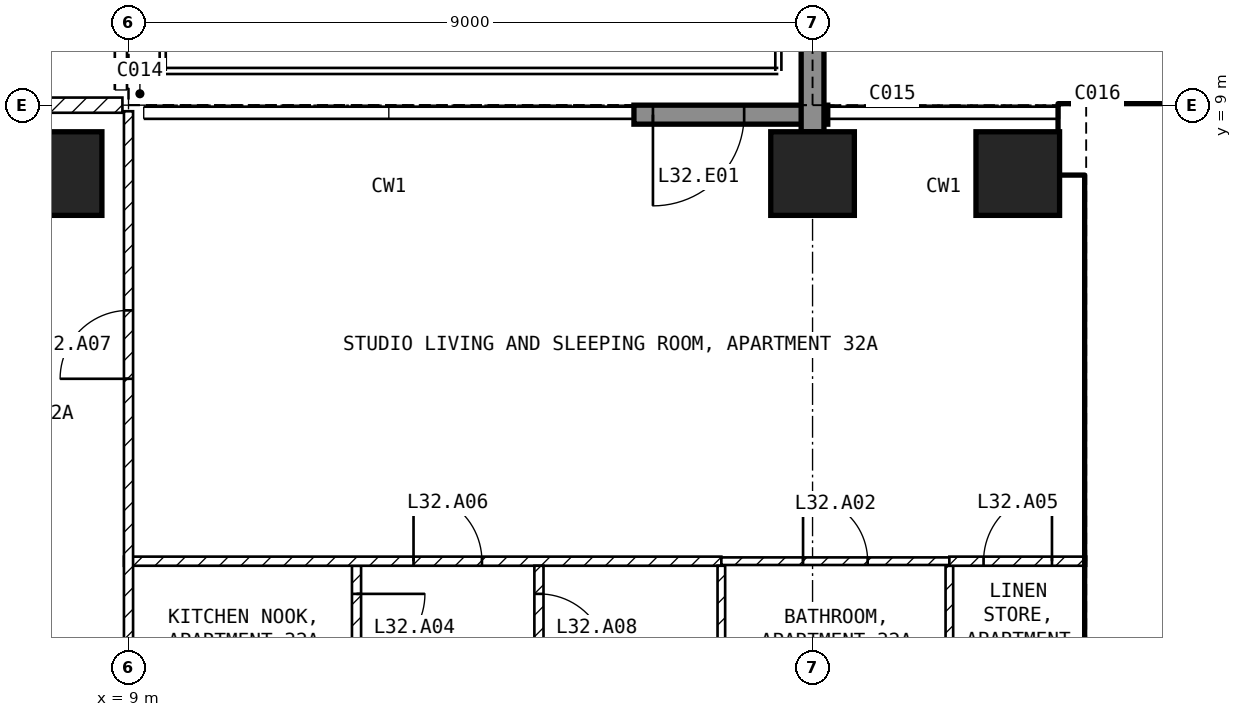
"""IFC4 building model, lengths in metres.
Left out: names, types, materials, properties, quantities, classifications, styles, units other than length and angle.
Written with IfcOpenShell. Run it as: python <this file> out.ifc"""

import sys

from ifc_helpers import new_model, si_unit, direction, frame, frame_2d, origin, origin_2d, place, context, subcontext, project, spatial, rectangle, extrude, element, fill, save


model = new_model("IFC4")
c1 = context("Model", 3, precision=1e-05, world=origin(), true_north=direction((0.0, 1.0)))
c2 = subcontext(c1, "Body", "Model", "MODEL_VIEW")
j1 = project(units=[si_unit("LENGTHUNIT", "METRE"), si_unit("PLANEANGLEUNIT", "RADIAN")], contexts=[c1])
p1 = place(None, origin())
s1 = spatial("IfcSite", under=j1, at=p1, CompositionType="ELEMENT")
p2 = place(p1, origin())
s2 = spatial("IfcBuilding", under=s1, at=p2, CompositionType="ELEMENT")
p3 = place(p2, frame((0.0, 0.0, 133.9)))
s3 = spatial("IfcBuildingStorey", under=s2, at=p3, CompositionType="ELEMENT", Elevation=133.9)
for number, where, z_axis, x_axis in (
    (1, (8.1, 8.1, -0.25), (0.0, 0.0, 1.0), (1.0, 0.0, 0.0)),
    (2, (18.0, 8.1, -0.25), (0.0, 0.0, 1.0), (1.0, 0.0, 0.0)),
    (3, (20.7, 8.1, -0.25), (0.0, 0.0, 1.0), (1.0, 0.0, 0.0)),
):
    element("IfcColumn", number, at=place(p3, frame(where, z_axis=z_axis, x_axis=x_axis)), inside=s3, PredefinedType="COLUMN", context=c2, shape_type="SweptSolid", body=[
        extrude(rectangle(XDim=1.1, YDim=1.1, at=origin_2d()), origin(), (0.0, 0.0, 1.0), 3.5),
    ])
p4 = place(p3, frame((18.2, 8.875, 0.0), z_axis=(0.0, 0.0, 1.0), x_axis=(-1.0, 0.0, 0.0)))
e4 = element("IfcWall", 4, at=p4, inside=s3, PredefinedType="SOLIDWALL", context=c2, shape_type="SweptSolid", body=[
    extrude(rectangle(XDim=2.55, YDim=0.25, at=frame_2d((1.275, 0.0))), origin(), (0.0, 0.0, 1.0), 3.25),
])
p5 = place(p4, frame((1.1, 0.0, 0.0)))
e5 = element("IfcOpeningElement", 5, at=p5, cuts=e4, PredefinedType="OPENING", context=c2, shape_type="SweptSolid", body=[
    extrude(rectangle(XDim=1.2, YDim=2.4, at=frame_2d((0.6, 1.2))), frame((0.0, 0.135, 0.0), z_axis=(0.0, -1.0, 0.0), x_axis=(1.0, 0.0, 0.0)), (0.0, 0.0, 1.0), 0.27),
])
p6 = place(p3, frame((18.0, 8.65, 0.0), z_axis=(0.0, 0.0, 1.0), x_axis=(0.0, 1.0, 0.0)))
e6 = element("IfcWall", 6, at=p6, inside=s3, PredefinedType="SOLIDWALL", context=c2, shape_type="SweptSolid", body=[
    extrude(rectangle(XDim=3.09, YDim=0.3, at=frame_2d((1.545, 0.0))), origin(), (0.0, 0.0, 1.0), 3.25),
])
p7 = place(p3, frame((21.25, 8.55, 0.0), z_axis=(0.0, 0.0, 1.0), x_axis=(1.0, 0.0, 0.0)))
e7 = element("IfcWall", 7, at=p7, inside=s3, PredefinedType="SHEAR", context=c2, shape_type="SweptSolid", body=[
    extrude(rectangle(XDim=8.2, YDim=0.9, at=frame_2d((4.1, 0.0))), origin(), (0.0, 0.0, 1.0), 3.25),
])
p8 = place(p3, frame((21.825, 1.2, 0.0), z_axis=(0.0, 0.0, 1.0), x_axis=(0.0, 1.0, 0.0)))
e8 = element("IfcWall", 8, at=p8, inside=s3, PredefinedType="SHEAR", context=c2, shape_type="SweptSolid", body=[
    extrude(rectangle(XDim=6.9, YDim=0.45, at=frame_2d((3.45, 0.0))), origin(), (0.0, 0.0, 1.0), 3.25),
])
p9 = place(p3, frame((22.05, 5.15, 0.0), z_axis=(0.0, 0.0, 1.0), x_axis=(1.0, 0.0, 0.0)))
e9 = element("IfcWall", 9, at=p9, inside=s3, PredefinedType="SOLIDWALL", context=c2, shape_type="SweptSolid", body=[
    extrude(rectangle(XDim=6.3, YDim=0.2, at=frame_2d((3.15, 0.0))), origin(), (0.0, 0.0, 1.0), 3.25),
])
p10 = place(p9, frame((0.2, 0.0, 0.0)))
e10 = element("IfcOpeningElement", 10, at=p10, cuts=e9, PredefinedType="OPENING", context=c2, shape_type="SweptSolid", body=[
    extrude(rectangle(XDim=1.0, YDim=2.1, at=frame_2d((0.5, 1.05))), frame((0.0, 0.11, 0.0), z_axis=(0.0, -1.0, 0.0), x_axis=(1.0, 0.0, 0.0)), (0.0, 0.0, 1.0), 0.22),
])
p11 = place(p3, frame((-8.92, 9.0, 0.0), z_axis=(0.0, 0.0, 1.0), x_axis=(1.0, 0.0, 0.0)))
e11 = element("IfcWall", 11, at=p11, inside=s3, PredefinedType="PARTITIONING", context=c2, shape_type="SweptSolid", body=[
    extrude(rectangle(XDim=17.84, YDim=0.2, at=frame_2d((8.92, 0.0))), origin(), (0.0, 0.0, 1.0), 3.25),
])
p12 = place(p11, frame((8.42, 0.0, 0.0)))
e12 = element("IfcOpeningElement", 12, at=p12, cuts=e11, PredefinedType="OPENING", context=c2, shape_type="SweptSolid", body=[
    extrude(rectangle(XDim=1.0, YDim=2.1, at=frame_2d((0.5, 1.05))), frame((0.0, 0.11, 0.0), z_axis=(0.0, -1.0, 0.0), x_axis=(1.0, 0.0, 0.0)), (0.0, 0.0, 1.0), 0.22),
])
p13 = place(p3, frame((12.0, 2.94, 0.0), z_axis=(0.0, 0.0, 1.0), x_axis=(0.0, -1.0, 0.0)))
e13 = element("IfcWall", 13, at=p13, inside=s3, PredefinedType="PARTITIONING", context=c2, shape_type="SweptSolid", body=[
    extrude(rectangle(XDim=1.64, YDim=0.12, at=frame_2d((0.82, 0.0))), origin(), (0.0, 0.0, 1.0), 3.25),
])
p14 = place(p13, frame((0.37, 0.0, 0.0)))
e14 = element("IfcOpeningElement", 14, at=p14, cuts=e13, PredefinedType="OPENING", context=c2, shape_type="SweptSolid", body=[
    extrude(rectangle(XDim=0.9, YDim=2.1, at=frame_2d((0.45, 1.05))), frame((0.0, 0.07, 0.0), z_axis=(0.0, -1.0, 0.0), x_axis=(1.0, 0.0, 0.0)), (0.0, 0.0, 1.0), 0.14),
])
p15 = place(p3, frame((8.94, 3.0, 0.0), z_axis=(0.0, 0.0, 1.0), x_axis=(1.0, 0.0, 0.0)))
e15 = element("IfcWall", 15, at=p15, inside=s3, PredefinedType="PARTITIONING", context=c2, shape_type="SweptSolid", body=[
    extrude(rectangle(XDim=7.86, YDim=0.12, at=frame_2d((3.93, 0.0))), origin(), (0.0, 0.0, 1.0), 3.25),
])
p16 = place(p15, frame((3.81, 0.0, 0.0)))
e16 = element("IfcOpeningElement", 16, at=p16, cuts=e15, PredefinedType="OPENING", context=c2, shape_type="SweptSolid", body=[
    extrude(rectangle(XDim=0.9, YDim=2.1, at=frame_2d((0.45, 1.05))), frame((0.0, 0.07, 0.0), z_axis=(0.0, -1.0, 0.0), x_axis=(1.0, 0.0, 0.0)), (0.0, 0.0, 1.0), 0.14),
])
p17 = place(p3, frame((9.0, 1.3, 0.0), z_axis=(0.0, 0.0, 1.0), x_axis=(0.0, 1.0, 0.0)))
e17 = element("IfcWall", 17, at=p17, inside=s3, PredefinedType="PARTITIONING", context=c2, shape_type="SweptSolid", body=[
    extrude(rectangle(XDim=7.62, YDim=0.12, at=frame_2d((3.81, 0.0))), origin(), (0.0, 0.0, 1.0), 3.25),
])
p18 = place(p17, frame((4.1, 0.0, 0.0)))
e18 = element("IfcOpeningElement", 18, at=p18, cuts=e17, PredefinedType="OPENING", context=c2, shape_type="SweptSolid", body=[
    extrude(rectangle(XDim=0.9, YDim=2.1, at=frame_2d((0.45, 1.05))), frame((0.0, 0.07, 0.0), z_axis=(0.0, -1.0, 0.0), x_axis=(1.0, 0.0, 0.0)), (0.0, 0.0, 1.0), 0.14),
])
p19 = place(p3, frame((14.4, 2.94, 0.0), z_axis=(0.0, 0.0, 1.0), x_axis=(0.0, -1.0, 0.0)))
e19 = element("IfcWall", 19, at=p19, inside=s3, PredefinedType="PARTITIONING", context=c2, shape_type="SweptSolid", body=[
    extrude(rectangle(XDim=1.64, YDim=0.12, at=frame_2d((0.82, 0.0))), origin(), (0.0, 0.0, 1.0), 3.25),
])
p20 = place(p19, frame((0.37, 0.0, 0.0)))
e20 = element("IfcOpeningElement", 20, at=p20, cuts=e19, PredefinedType="OPENING", context=c2, shape_type="SweptSolid", body=[
    extrude(rectangle(XDim=0.9, YDim=2.1, at=frame_2d((0.45, 1.05))), frame((0.0, 0.07, 0.0), z_axis=(0.0, -1.0, 0.0), x_axis=(1.0, 0.0, 0.0)), (0.0, 0.0, 1.0), 0.14),
])
for number, where, z_axis, x_axis in (
    (21, (16.8, 2.94, 0.0), (0.0, 0.0, 1.0), (0.0, -1.0, 0.0)),
    (22, (19.8, 2.94, 0.0), (0.0, 0.0, 1.0), (0.0, -1.0, 0.0)),
):
    element("IfcWall", number, at=place(p3, frame(where, z_axis=z_axis, x_axis=x_axis)), inside=s3, PredefinedType="PARTITIONING", context=c2, shape_type="SweptSolid", body=[
        extrude(rectangle(XDim=1.64, YDim=0.1, at=frame_2d((0.82, 0.0))), origin(), (0.0, 0.0, 1.0), 3.25),
    ])
p21 = place(p3, frame((16.8, 3.0, 0.0), z_axis=(0.0, 0.0, 1.0), x_axis=(1.0, 0.0, 0.0)))
e23 = element("IfcWall", 23, at=p21, inside=s3, PredefinedType="PARTITIONING", context=c2, shape_type="SweptSolid", body=[
    extrude(rectangle(XDim=3.0, YDim=0.1, at=frame_2d((1.5, 0.0))), origin(), (0.0, 0.0, 1.0), 3.25),
])
p22 = place(p21, frame((1.075, 0.0, 0.0)))
e24 = element("IfcOpeningElement", 24, at=p22, cuts=e23, PredefinedType="OPENING", context=c2, shape_type="SweptSolid", body=[
    extrude(rectangle(XDim=0.85, YDim=2.1, at=frame_2d((0.425, 1.05))), frame((0.0, 0.06, 0.0), z_axis=(0.0, -1.0, 0.0), x_axis=(1.0, 0.0, 0.0)), (0.0, 0.0, 1.0), 0.12),
])
p23 = place(p3, frame((19.8, 3.0, 0.0), z_axis=(0.0, 0.0, 1.0), x_axis=(1.0, 0.0, 0.0)))
e25 = element("IfcWall", 25, at=p23, inside=s3, PredefinedType="PARTITIONING", context=c2, shape_type="SweptSolid", body=[
    extrude(rectangle(XDim=1.8, YDim=0.12, at=frame_2d((0.9, 0.0))), origin(), (0.0, 0.0, 1.0), 3.25),
])
p24 = place(p23, frame((0.45, 0.0, 0.0)))
e26 = element("IfcOpeningElement", 26, at=p24, cuts=e25, PredefinedType="OPENING", context=c2, shape_type="SweptSolid", body=[
    extrude(rectangle(XDim=0.9, YDim=2.1, at=frame_2d((0.45, 1.05))), frame((0.0, 0.07, 0.0), z_axis=(0.0, -1.0, 0.0), x_axis=(1.0, 0.0, 0.0)), (0.0, 0.0, 1.0), 0.14),
])
p25 = place(p5, origin())
e27 = element("IfcDoor", 27, at=p25, inside=s3, OperationType="SINGLE_SWING_RIGHT", PredefinedType="DOOR", context=c2, shape_type="SweptSolid", body=[
    extrude(rectangle(XDim=1.2, YDim=2.4, at=frame_2d((0.6, 1.2))), frame((0.0, 0.025, 0.0), z_axis=(0.0, -1.0, 0.0), x_axis=(1.0, 0.0, 0.0)), (0.0, 0.0, 1.0), 0.05),
])
fill(e5, e27)
p26 = place(p10, origin())
e28 = element("IfcDoor", 28, at=p26, inside=s3, OperationType="SINGLE_SWING_LEFT", PredefinedType="DOOR", context=c2, shape_type="SweptSolid", body=[
    extrude(rectangle(XDim=1.0, YDim=2.1, at=frame_2d((0.5, 1.05))), frame((0.0, 0.025, 0.0), z_axis=(0.0, -1.0, 0.0), x_axis=(1.0, 0.0, 0.0)), (0.0, 0.0, 1.0), 0.05),
])
fill(e10, e28)
p27 = place(p22, origin())
e29 = element("IfcDoor", 29, at=p27, inside=s3, OperationType="SINGLE_SWING_LEFT", PredefinedType="DOOR", context=c2, shape_type="SweptSolid", body=[
    extrude(rectangle(XDim=0.85, YDim=2.1, at=frame_2d((0.425, 1.05))), frame((0.0, 0.025, 0.0), z_axis=(0.0, -1.0, 0.0), x_axis=(1.0, 0.0, 0.0)), (0.0, 0.0, 1.0), 0.05),
])
fill(e24, e29)
p28 = place(p14, origin())
e30 = element("IfcDoor", 30, at=p28, inside=s3, OperationType="SINGLE_SWING_LEFT", PredefinedType="DOOR", context=c2, shape_type="SweptSolid", body=[
    extrude(rectangle(XDim=0.9, YDim=2.1, at=frame_2d((0.45, 1.05))), frame((0.0, 0.025, 0.0), z_axis=(0.0, -1.0, 0.0), x_axis=(1.0, 0.0, 0.0)), (0.0, 0.0, 1.0), 0.05),
])
fill(e14, e30)
p29 = place(p24, origin())
e31 = element("IfcDoor", 31, at=p29, inside=s3, OperationType="SINGLE_SWING_RIGHT", PredefinedType="DOOR", context=c2, shape_type="SweptSolid", body=[
    extrude(rectangle(XDim=0.9, YDim=2.1, at=frame_2d((0.45, 1.05))), frame((0.0, 0.025, 0.0), z_axis=(0.0, -1.0, 0.0), x_axis=(1.0, 0.0, 0.0)), (0.0, 0.0, 1.0), 0.05),
])
fill(e26, e31)
p30 = place(p16, origin())
e32 = element("IfcDoor", 32, at=p30, inside=s3, OperationType="SINGLE_SWING_LEFT", PredefinedType="DOOR", context=c2, shape_type="SweptSolid", body=[
    extrude(rectangle(XDim=0.9, YDim=2.1, at=frame_2d((0.45, 1.05))), frame((0.0, 0.025, 0.0), z_axis=(0.0, -1.0, 0.0), x_axis=(1.0, 0.0, 0.0)), (0.0, 0.0, 1.0), 0.05),
])
fill(e16, e32)
p31 = place(p18, origin())
e33 = element("IfcDoor", 33, at=p31, inside=s3, OperationType="SINGLE_SWING_LEFT", PredefinedType="DOOR", context=c2, shape_type="SweptSolid", body=[
    extrude(rectangle(XDim=0.9, YDim=2.1, at=frame_2d((0.45, 1.05))), frame((0.0, 0.025, 0.0), z_axis=(0.0, -1.0, 0.0), x_axis=(1.0, 0.0, 0.0)), (0.0, 0.0, 1.0), 0.05),
])
fill(e18, e33)
p32 = place(p20, origin())
e34 = element("IfcDoor", 34, at=p32, inside=s3, OperationType="SINGLE_SWING_RIGHT", PredefinedType="DOOR", context=c2, shape_type="SweptSolid", body=[
    extrude(rectangle(XDim=0.9, YDim=2.1, at=frame_2d((0.45, 1.05))), frame((0.0, 0.025, 0.0), z_axis=(0.0, -1.0, 0.0), x_axis=(1.0, 0.0, 0.0)), (0.0, 0.0, 1.0), 0.05),
])
fill(e20, e34)
save(model, sys.argv[1])
